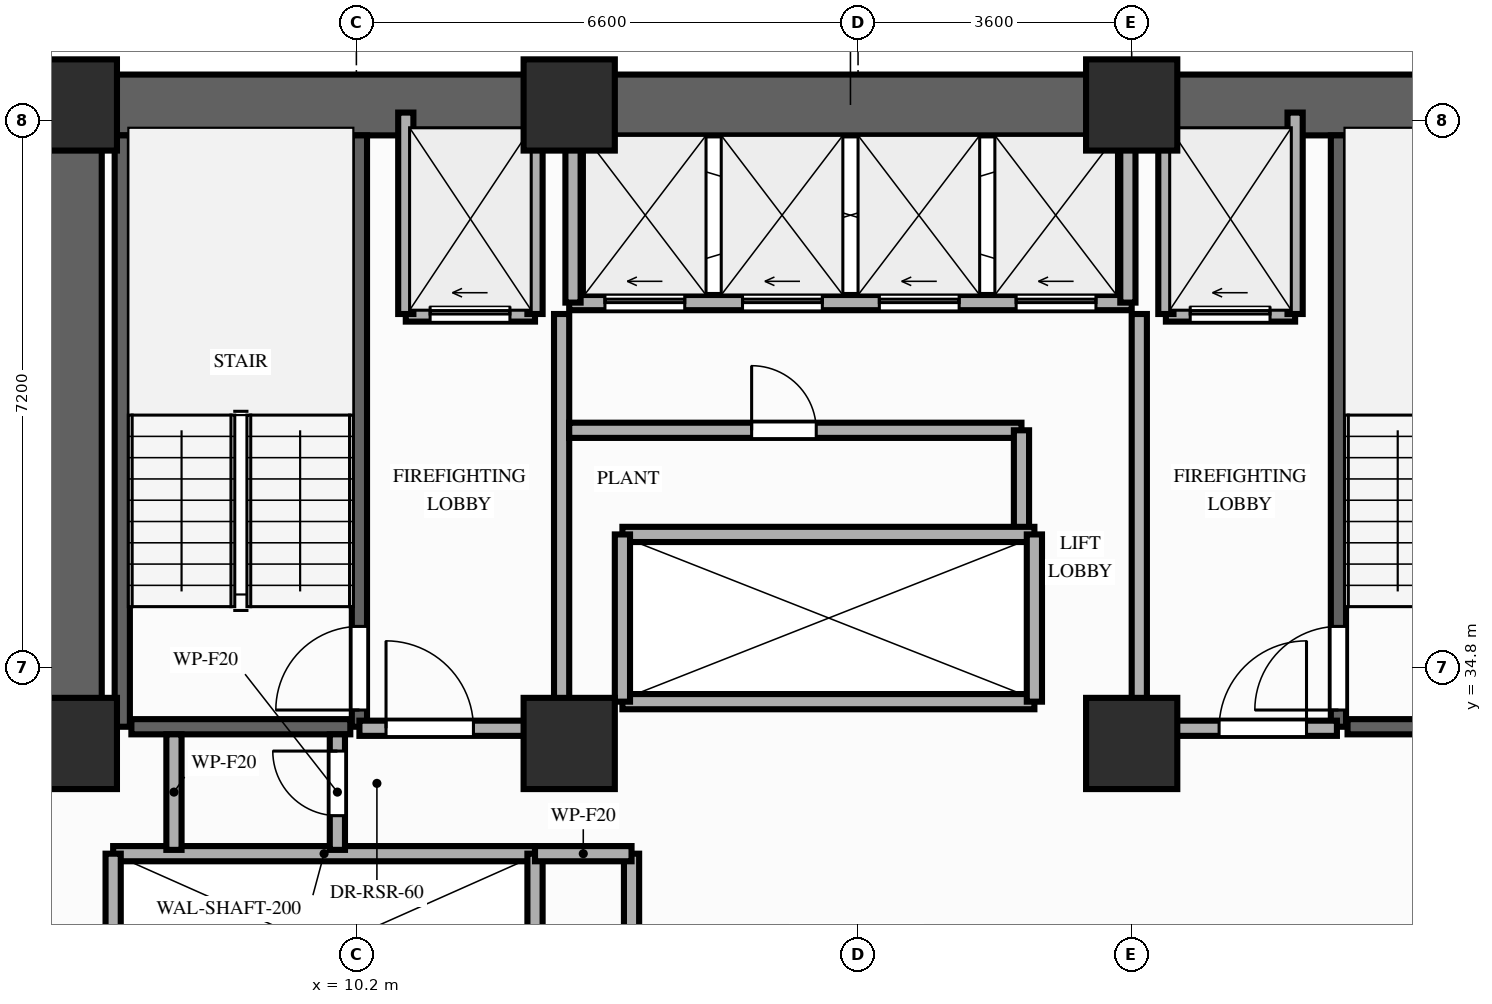
"""IFC4 building model, lengths in metres.
Left out: names, types, materials, properties, quantities, classifications, styles, units other than length and angle.
Written with IfcOpenShell. Run it as: python <this file> out.ifc"""

import sys

from ifc_helpers import new_model, si_unit, direction, frame, frame_2d, origin, origin_2d, place, context, subcontext, project, spatial, rectangle, extrude, element, fill, save


model = new_model("IFC4")
c1 = context("Model", 3, precision=1e-05, world=origin(), true_north=direction((0.0, 1.0)))
c2 = subcontext(c1, "Body", "Model", "MODEL_VIEW")
j1 = project(units=[si_unit("LENGTHUNIT", "METRE"), si_unit("PLANEANGLEUNIT", "RADIAN")], contexts=[c1])
p1 = place(None, origin())
s1 = spatial("IfcSite", under=j1, at=p1, CompositionType="ELEMENT")
p2 = place(p1, origin())
s2 = spatial("IfcBuilding", under=s1, at=p2, CompositionType="ELEMENT")
p3 = place(p2, frame((0.0, 0.0, 69.2)))
s3 = spatial("IfcBuildingStorey", under=s2, at=p3, CompositionType="ELEMENT", Elevation=69.2)
for number, where, z_axis, x_axis in (
    (1, (6.45, 33.8, 0.0), (0.0, 0.0, 1.0), (1.0, 0.0, 0.0)),
    (2, (13.0, 33.8, 0.0), (0.0, 0.0, 1.0), (1.0, 0.0, 0.0)),
    (3, (20.4, 33.8, 0.0), (0.0, 0.0, 1.0), (1.0, 0.0, 0.0)),
    (4, (6.45, 42.2, 0.0), (0.0, 0.0, 1.0), (1.0, 0.0, 0.0)),
    (5, (13.0, 42.2, 0.0), (0.0, 0.0, 1.0), (1.0, 0.0, 0.0)),
    (6, (20.4, 42.2, 0.0), (0.0, 0.0, 1.0), (1.0, 0.0, 0.0)),
):
    element("IfcColumn", number, at=place(p3, frame(where, z_axis=z_axis, x_axis=x_axis)), inside=s3, PredefinedType="COLUMN", context=c2, shape_type="SweptSolid", body=[
        extrude(rectangle(XDim=1.2, YDim=1.2, at=origin_2d()), origin(), (0.0, 0.0, 1.0), 3.2),
    ])
p4 = place(p3, frame((6.45, 42.2, 0.0), z_axis=(0.0, 0.0, 1.0), x_axis=(1.0, 0.0, 0.0)))
e7 = element("IfcWall", 7, at=p4, inside=s3, PredefinedType="SHEAR", context=c2, shape_type="SweptSolid", body=[
    extrude(rectangle(XDim=20.45, YDim=0.8, at=frame_2d((10.225, 0.0))), origin(), (0.0, 0.0, 1.0), 3.02),
])
p5 = place(p3, frame((6.45, 33.8, 0.0), z_axis=(0.0, 0.0, 1.0), x_axis=(0.0, 1.0, 0.0)))
e8 = element("IfcWall", 8, at=p5, inside=s3, PredefinedType="SHEAR", context=c2, shape_type="SweptSolid", body=[
    extrude(rectangle(XDim=7.95, YDim=0.8, at=frame_2d((3.975, 0.0))), origin(), (0.0, 0.0, 1.0), 3.02),
])
p6 = place(p3, frame((7.12, 34.02, 0.0), z_axis=(0.0, 0.0, 1.0), x_axis=(0.0, 1.0, 0.0)))
e9 = element("IfcWall", 9, at=p6, inside=s3, PredefinedType="SHEAR", context=c2, shape_type="SweptSolid", body=[
    extrude(rectangle(XDim=7.78, YDim=0.2, at=frame_2d((3.89, 0.0))), origin(), (0.0, 0.0, 1.0), 3.02),
])
p7 = place(p3, frame((10.24, 34.02, 0.0), z_axis=(0.0, 0.0, 1.0), x_axis=(0.0, 1.0, 0.0)))
e10 = element("IfcWall", 10, at=p7, inside=s3, PredefinedType="SHEAR", context=c2, shape_type="SweptSolid", body=[
    extrude(rectangle(XDim=7.78, YDim=0.2, at=frame_2d((3.89, 0.0))), origin(), (0.0, 0.0, 1.0), 3.02),
])
p8 = place(p7, frame((0.22, 0.0, 0.0)))
e11 = element("IfcOpeningElement", 11, at=p8, cuts=e10, PredefinedType="OPENING", context=c2, shape_type="SweptSolid", body=[
    extrude(rectangle(XDim=1.1, YDim=2.15, at=frame_2d((0.55, 1.075))), frame((0.0, 0.11, 0.0), z_axis=(0.0, -1.0, 0.0), x_axis=(1.0, 0.0, 0.0)), (0.0, 0.0, 1.0), 0.22),
])
p9 = place(p3, frame((7.24, 34.02, 0.0), z_axis=(0.0, 0.0, 1.0), x_axis=(1.0, 0.0, 0.0)))
e12 = element("IfcWall", 12, at=p9, inside=s3, PredefinedType="SHEAR", context=c2, shape_type="SweptSolid", body=[
    extrude(rectangle(XDim=2.88, YDim=0.2, at=frame_2d((1.44, 0.0))), origin(), (0.0, 0.0, 1.0), 3.02),
])
p10 = place(p3, frame((23.12, 34.02, 0.0), z_axis=(0.0, 0.0, 1.0), x_axis=(0.0, 1.0, 0.0)))
e13 = element("IfcWall", 13, at=p10, inside=s3, PredefinedType="SHEAR", context=c2, shape_type="SweptSolid", body=[
    extrude(rectangle(XDim=7.78, YDim=0.2, at=frame_2d((3.89, 0.0))), origin(), (0.0, 0.0, 1.0), 3.02),
])
p11 = place(p10, frame((0.22, 0.0, 0.0)))
e14 = element("IfcOpeningElement", 14, at=p11, cuts=e13, PredefinedType="OPENING", context=c2, shape_type="SweptSolid", body=[
    extrude(rectangle(XDim=1.1, YDim=2.15, at=frame_2d((0.55, 1.075))), frame((0.0, 0.11, 0.0), z_axis=(0.0, -1.0, 0.0), x_axis=(1.0, 0.0, 0.0)), (0.0, 0.0, 1.0), 0.22),
])
p12 = place(p3, frame((23.24, 34.02, 0.0), z_axis=(0.0, 0.0, 1.0), x_axis=(1.0, 0.0, 0.0)))
e15 = element("IfcWall", 15, at=p12, inside=s3, PredefinedType="SHEAR", context=c2, shape_type="SweptSolid", body=[
    extrude(rectangle(XDim=2.88, YDim=0.2, at=frame_2d((1.44, 0.0))), origin(), (0.0, 0.0, 1.0), 3.02),
])
p13 = place(p3, frame((7.0, 32.35, 0.0), z_axis=(0.0, 0.0, 1.0), x_axis=(1.0, 0.0, 0.0)))
e16 = element("IfcWall", 16, at=p13, inside=s3, PredefinedType="MOVABLE", context=c2, shape_type="SweptSolid", body=[
    extrude(rectangle(XDim=5.55, YDim=0.2, at=frame_2d((2.775, 0.0))), origin(), (0.0, 0.0, 1.0), 3.02),
])
for number, where, z_axis, x_axis in (
    (17, (7.0, 29.85, 0.0), (0.0, 0.0, 1.0), (0.0, 1.0, 0.0)),
    (18, (12.55, 29.85, 0.0), (0.0, 0.0, 1.0), (0.0, 1.0, 0.0)),
):
    element("IfcWall", number, at=place(p3, frame(where, z_axis=z_axis, x_axis=x_axis)), inside=s3, PredefinedType="MOVABLE", context=c2, shape_type="SweptSolid", body=[
        extrude(rectangle(XDim=2.5, YDim=0.2, at=frame_2d((1.25, 0.0))), origin(), (0.0, 0.0, 1.0), 3.02),
    ])
p14 = place(p3, frame((10.85, 39.45, 0.0), z_axis=(0.0, 0.0, 1.0), x_axis=(1.0, 0.0, 0.0)))
e19 = element("IfcWall", 19, at=p14, inside=s3, PredefinedType="MOVABLE", context=c2, shape_type="SweptSolid", body=[
    extrude(rectangle(XDim=1.7, YDim=0.2, at=frame_2d((0.85, 0.0))), origin(), (0.0, 0.0, 1.0), 3.02),
])
p15 = place(p14, frame((0.32, 0.0, 0.0)))
e20 = element("IfcOpeningElement", 20, at=p15, cuts=e19, PredefinedType="OPENING", context=c2, shape_type="SweptSolid", body=[
    extrude(rectangle(XDim=1.05, YDim=2.15, at=frame_2d((0.525, 1.075))), frame((0.0, 0.11, 0.0), z_axis=(0.0, -1.0, 0.0), x_axis=(1.0, 0.0, 0.0)), (0.0, 0.0, 1.0), 0.22),
])
p16 = place(p3, frame((20.85, 39.45, 0.0), z_axis=(0.0, 0.0, 1.0), x_axis=(1.0, 0.0, 0.0)))
e21 = element("IfcWall", 21, at=p16, inside=s3, PredefinedType="MOVABLE", context=c2, shape_type="SweptSolid", body=[
    extrude(rectangle(XDim=1.7, YDim=0.2, at=frame_2d((0.85, 0.0))), origin(), (0.0, 0.0, 1.0), 3.02),
])
p17 = place(p16, frame((0.32, 0.0, 0.0)))
e22 = element("IfcOpeningElement", 22, at=p17, cuts=e21, PredefinedType="OPENING", context=c2, shape_type="SweptSolid", body=[
    extrude(rectangle(XDim=1.05, YDim=2.15, at=frame_2d((0.525, 1.075))), frame((0.0, 0.11, 0.0), z_axis=(0.0, -1.0, 0.0), x_axis=(1.0, 0.0, 0.0)), (0.0, 0.0, 1.0), 0.22),
])
for number, where, z_axis, x_axis in (
    (23, (10.85, 39.45, 0.0), (0.0, 0.0, 1.0), (0.0, 1.0, 0.0)),
    (24, (12.55, 39.45, 0.0), (0.0, 0.0, 1.0), (0.0, 1.0, 0.0)),
):
    element("IfcWall", number, at=place(p3, frame(where, z_axis=z_axis, x_axis=x_axis)), inside=s3, PredefinedType="MOVABLE", context=c2, shape_type="SweptSolid", body=[
        extrude(rectangle(XDim=2.65, YDim=0.2, at=frame_2d((1.325, 0.0))), origin(), (0.0, 0.0, 1.0), 2.41),
    ])
p18 = place(p3, frame((12.9, 34.0, 0.0), z_axis=(0.0, 0.0, 1.0), x_axis=(0.0, 1.0, 0.0)))
e25 = element("IfcWall", 25, at=p18, inside=s3, PredefinedType="PARTITIONING", context=c2, shape_type="SweptSolid", body=[
    extrude(rectangle(XDim=5.45, YDim=0.2, at=frame_2d((2.725, 0.0))), origin(), (0.0, 0.0, 1.0), 2.41),
])
p19 = place(p3, frame((10.24, 34.0, 0.0), z_axis=(0.0, 0.0, 1.0), x_axis=(1.0, 0.0, 0.0)))
e26 = element("IfcWall", 26, at=p19, inside=s3, PredefinedType="PARTITIONING", context=c2, shape_type="SweptSolid", body=[
    extrude(rectangle(XDim=2.66, YDim=0.2, at=frame_2d((1.33, 0.0))), origin(), (0.0, 0.0, 1.0), 2.41),
])
p20 = place(p19, frame((0.35, 0.0, 0.0)))
e27 = element("IfcOpeningElement", 27, at=p20, cuts=e26, PredefinedType="OPENING", context=c2, shape_type="SweptSolid", body=[
    extrude(rectangle(XDim=1.15, YDim=2.15, at=frame_2d((0.575, 1.075))), frame((0.0, 0.11, 0.0), z_axis=(0.0, -1.0, 0.0), x_axis=(1.0, 0.0, 0.0)), (0.0, 0.0, 1.0), 0.22),
])
for number, where, z_axis, x_axis in (
    (28, (20.85, 39.45, 0.0), (0.0, 0.0, 1.0), (0.0, 1.0, 0.0)),
    (29, (22.55, 39.45, 0.0), (0.0, 0.0, 1.0), (0.0, 1.0, 0.0)),
):
    element("IfcWall", number, at=place(p3, frame(where, z_axis=z_axis, x_axis=x_axis)), inside=s3, PredefinedType="MOVABLE", context=c2, shape_type="SweptSolid", body=[
        extrude(rectangle(XDim=2.65, YDim=0.2, at=frame_2d((1.325, 0.0))), origin(), (0.0, 0.0, 1.0), 2.41),
    ])
p21 = place(p3, frame((20.5, 34.0, 0.0), z_axis=(0.0, 0.0, 1.0), x_axis=(0.0, 1.0, 0.0)))
e30 = element("IfcWall", 30, at=p21, inside=s3, PredefinedType="PARTITIONING", context=c2, shape_type="SweptSolid", body=[
    extrude(rectangle(XDim=5.45, YDim=0.2, at=frame_2d((2.725, 0.0))), origin(), (0.0, 0.0, 1.0), 2.41),
])
p22 = place(p3, frame((20.5, 34.0, 0.0), z_axis=(0.0, 0.0, 1.0), x_axis=(1.0, 0.0, 0.0)))
e31 = element("IfcWall", 31, at=p22, inside=s3, PredefinedType="PARTITIONING", context=c2, shape_type="SweptSolid", body=[
    extrude(rectangle(XDim=2.6, YDim=0.2, at=frame_2d((1.3, 0.0))), origin(), (0.0, 0.0, 1.0), 2.41),
])
p23 = place(p22, frame((1.05, 0.0, 0.0)))
e32 = element("IfcOpeningElement", 32, at=p23, cuts=e31, PredefinedType="OPENING", context=c2, shape_type="SweptSolid", body=[
    extrude(rectangle(XDim=1.15, YDim=2.15, at=frame_2d((0.575, 1.075))), frame((0.0, 0.11, 0.0), z_axis=(0.0, -1.0, 0.0), x_axis=(1.0, 0.0, 0.0)), (0.0, 0.0, 1.0), 0.22),
])
p24 = place(p3, frame((13.82, 29.85, 0.0), z_axis=(0.0, 0.0, 1.0), x_axis=(0.0, 1.0, 0.0)))
e33 = element("IfcWall", 33, at=p24, inside=s3, PredefinedType="PARTITIONING", context=c2, shape_type="SweptSolid", body=[
    extrude(rectangle(XDim=2.5, YDim=0.2, at=frame_2d((1.25, 0.0))), origin(), (0.0, 0.0, 1.0), 3.02),
])
p25 = place(p3, frame((12.55, 32.35, 0.0), z_axis=(0.0, 0.0, 1.0), x_axis=(1.0, 0.0, 0.0)))
e34 = element("IfcWall", 34, at=p25, inside=s3, PredefinedType="PARTITIONING", context=c2, shape_type="SweptSolid", body=[
    extrude(rectangle(XDim=1.27, YDim=0.2, at=frame_2d((0.635, 0.0))), origin(), (0.0, 0.0, 1.0), 3.02),
])
p26 = place(p3, frame((7.8, 32.4, 0.0), z_axis=(0.0, 0.0, 1.0), x_axis=(0.0, 1.0, 0.0)))
e35 = element("IfcWall", 35, at=p26, inside=s3, PredefinedType="PARTITIONING", context=c2, shape_type="SweptSolid", body=[
    extrude(rectangle(XDim=1.52, YDim=0.2, at=frame_2d((0.76, 0.0))), origin(), (0.0, 0.0, 1.0), 2.41),
])
p27 = place(p3, frame((9.95, 32.4, 0.0), z_axis=(0.0, 0.0, 1.0), x_axis=(0.0, 1.0, 0.0)))
e36 = element("IfcWall", 36, at=p27, inside=s3, PredefinedType="PARTITIONING", context=c2, shape_type="SweptSolid", body=[
    extrude(rectangle(XDim=1.52, YDim=0.2, at=frame_2d((0.76, 0.0))), origin(), (0.0, 0.0, 1.0), 2.41),
])
p28 = place(p27, frame((0.45, 0.0, 0.0)))
e37 = element("IfcOpeningElement", 37, at=p28, cuts=e36, PredefinedType="OPENING", context=c2, shape_type="SweptSolid", body=[
    extrude(rectangle(XDim=0.85, YDim=2.05, at=frame_2d((0.425, 1.025))), frame((0.0, 0.11, 0.0), z_axis=(0.0, -1.0, 0.0), x_axis=(1.0, 0.0, 0.0)), (0.0, 0.0, 1.0), 0.22),
])
p29 = place(p3, frame((13.0, 39.6, 0.0), z_axis=(0.0, 0.0, 1.0), x_axis=(1.0, 0.0, 0.0)))
e38 = element("IfcWall", 38, at=p29, inside=s3, PredefinedType="MOVABLE", context=c2, shape_type="SweptSolid", body=[
    extrude(rectangle(XDim=7.4, YDim=0.2, at=frame_2d((3.7, 0.0))), origin(), (0.0, 0.0, 1.0), 3.02),
])
p30 = place(p29, frame((0.47, 0.0, 0.0)))
e39 = element("IfcOpeningElement", 39, at=p30, cuts=e38, PredefinedType="OPENING", context=c2, shape_type="SweptSolid", body=[
    extrude(rectangle(XDim=1.05, YDim=2.15, at=frame_2d((0.525, 1.075))), frame((0.0, 0.11, 0.0), z_axis=(0.0, -1.0, 0.0), x_axis=(1.0, 0.0, 0.0)), (0.0, 0.0, 1.0), 0.22),
])
p31 = place(p29, frame((2.28, 0.0, 0.0)))
e40 = element("IfcOpeningElement", 40, at=p31, cuts=e38, PredefinedType="OPENING", context=c2, shape_type="SweptSolid", body=[
    extrude(rectangle(XDim=1.05, YDim=2.15, at=frame_2d((0.525, 1.075))), frame((0.0, 0.11, 0.0), z_axis=(0.0, -1.0, 0.0), x_axis=(1.0, 0.0, 0.0)), (0.0, 0.0, 1.0), 0.22),
])
p32 = place(p29, frame((4.08, 0.0, 0.0)))
e41 = element("IfcOpeningElement", 41, at=p32, cuts=e38, PredefinedType="OPENING", context=c2, shape_type="SweptSolid", body=[
    extrude(rectangle(XDim=1.05, YDim=2.15, at=frame_2d((0.525, 1.075))), frame((0.0, 0.11, 0.0), z_axis=(0.0, -1.0, 0.0), x_axis=(1.0, 0.0, 0.0)), (0.0, 0.0, 1.0), 0.22),
])
p33 = place(p29, frame((5.88, 0.0, 0.0)))
e42 = element("IfcOpeningElement", 42, at=p33, cuts=e38, PredefinedType="OPENING", context=c2, shape_type="SweptSolid", body=[
    extrude(rectangle(XDim=1.05, YDim=2.15, at=frame_2d((0.525, 1.075))), frame((0.0, 0.11, 0.0), z_axis=(0.0, -1.0, 0.0), x_axis=(1.0, 0.0, 0.0)), (0.0, 0.0, 1.0), 0.22),
])
for number, where, z_axis, x_axis in (
    (43, (13.05, 39.6, 0.0), (0.0, 0.0, 1.0), (0.0, 1.0, 0.0)),
    (44, (20.35, 39.6, 0.0), (0.0, 0.0, 1.0), (0.0, 1.0, 0.0)),
):
    element("IfcWall", number, at=place(p3, frame(where, z_axis=z_axis, x_axis=x_axis)), inside=s3, PredefinedType="MOVABLE", context=c2, shape_type="SweptSolid", body=[
        extrude(rectangle(XDim=2.18, YDim=0.2, at=frame_2d((1.09, 0.0))), origin(), (0.0, 0.0, 1.0), 3.02),
    ])
p34 = place(p3, frame((13.0, 37.92, 0.0), z_axis=(0.0, 0.0, 1.0), x_axis=(1.0, 0.0, 0.0)))
e45 = element("IfcWall", 45, at=p34, inside=s3, PredefinedType="PARTITIONING", context=c2, shape_type="SweptSolid", body=[
    extrude(rectangle(XDim=5.95, YDim=0.2, at=frame_2d((2.975, 0.0))), origin(), (0.0, 0.0, 1.0), 3.02),
])
p35 = place(p34, frame((2.4, 0.0, 0.0)))
e46 = element("IfcOpeningElement", 46, at=p35, cuts=e45, PredefinedType="OPENING", context=c2, shape_type="SweptSolid", body=[
    extrude(rectangle(XDim=0.85, YDim=2.05, at=frame_2d((0.425, 1.025))), frame((0.0, 0.11, 0.0), z_axis=(0.0, -1.0, 0.0), x_axis=(1.0, 0.0, 0.0)), (0.0, 0.0, 1.0), 0.22),
])
p36 = place(p3, frame((18.95, 36.6, 0.0), z_axis=(0.0, 0.0, 1.0), x_axis=(0.0, 1.0, 0.0)))
e47 = element("IfcWall", 47, at=p36, inside=s3, PredefinedType="PARTITIONING", context=c2, shape_type="SweptSolid", body=[
    extrude(rectangle(XDim=1.32, YDim=0.2, at=frame_2d((0.66, 0.0))), origin(), (0.0, 0.0, 1.0), 3.02),
])
for number, where, z_axis, x_axis in (
    (48, (13.7, 34.35, 0.0), (0.0, 0.0, 1.0), (1.0, 0.0, 0.0)),
    (49, (13.7, 36.55, 0.0), (0.0, 0.0, 1.0), (1.0, 0.0, 0.0)),
):
    element("IfcWall", number, at=place(p3, frame(where, z_axis=z_axis, x_axis=x_axis)), inside=s3, PredefinedType="MOVABLE", context=c2, shape_type="SweptSolid", body=[
        extrude(rectangle(XDim=5.42, YDim=0.2, at=frame_2d((2.71, 0.0))), origin(), (0.0, 0.0, 1.0), 3.02),
    ])
for number, where, z_axis, x_axis in (
    (50, (13.7, 34.35, 0.0), (0.0, 0.0, 1.0), (0.0, 1.0, 0.0)),
    (51, (19.12, 34.35, 0.0), (0.0, 0.0, 1.0), (0.0, 1.0, 0.0)),
):
    element("IfcWall", number, at=place(p3, frame(where, z_axis=z_axis, x_axis=x_axis)), inside=s3, PredefinedType="MOVABLE", context=c2, shape_type="SweptSolid", body=[
        extrude(rectangle(XDim=2.2, YDim=0.2, at=frame_2d((1.1, 0.0))), origin(), (0.0, 0.0, 1.0), 3.02),
    ])
p37 = place(p8, origin())
e52 = element("IfcDoor", 52, at=p37, inside=s3, OperationType="SINGLE_SWING_LEFT", PredefinedType="DOOR", context=c2, shape_type="SweptSolid", body=[
    extrude(rectangle(XDim=1.1, YDim=2.15, at=frame_2d((0.55, 1.075))), frame((0.0, 0.025, 0.0), z_axis=(0.0, -1.0, 0.0), x_axis=(1.0, 0.0, 0.0)), (0.0, 0.0, 1.0), 0.05),
])
fill(e11, e52)
p38 = place(p11, origin())
e53 = element("IfcDoor", 53, at=p38, inside=s3, OperationType="SINGLE_SWING_LEFT", PredefinedType="DOOR", context=c2, shape_type="SweptSolid", body=[
    extrude(rectangle(XDim=1.1, YDim=2.15, at=frame_2d((0.55, 1.075))), frame((0.0, 0.025, 0.0), z_axis=(0.0, -1.0, 0.0), x_axis=(1.0, 0.0, 0.0)), (0.0, 0.0, 1.0), 0.05),
])
fill(e14, e53)
p39 = place(p15, origin())
e54 = element("IfcDoor", 54, at=p39, inside=s3, OperationType="SLIDING_TO_LEFT", PredefinedType="DOOR", context=c2, shape_type="SweptSolid", body=[
    extrude(rectangle(XDim=1.05, YDim=2.15, at=frame_2d((0.525, 1.075))), frame((0.0, 0.025, 0.0), z_axis=(0.0, -1.0, 0.0), x_axis=(1.0, 0.0, 0.0)), (0.0, 0.0, 1.0), 0.05),
])
fill(e20, e54)
p40 = place(p17, origin())
e55 = element("IfcDoor", 55, at=p40, inside=s3, OperationType="SLIDING_TO_LEFT", PredefinedType="DOOR", context=c2, shape_type="SweptSolid", body=[
    extrude(rectangle(XDim=1.05, YDim=2.15, at=frame_2d((0.525, 1.075))), frame((0.0, 0.025, 0.0), z_axis=(0.0, -1.0, 0.0), x_axis=(1.0, 0.0, 0.0)), (0.0, 0.0, 1.0), 0.05),
])
fill(e22, e55)
p41 = place(p20, origin())
e56 = element("IfcDoor", 56, at=p41, inside=s3, OperationType="SINGLE_SWING_LEFT", PredefinedType="DOOR", context=c2, shape_type="SweptSolid", body=[
    extrude(rectangle(XDim=1.15, YDim=2.15, at=frame_2d((0.575, 1.075))), frame((0.0, 0.025, 0.0), z_axis=(0.0, -1.0, 0.0), x_axis=(1.0, 0.0, 0.0)), (0.0, 0.0, 1.0), 0.05),
])
fill(e27, e56)
p42 = place(p23, origin())
e57 = element("IfcDoor", 57, at=p42, inside=s3, OperationType="SINGLE_SWING_RIGHT", PredefinedType="DOOR", context=c2, shape_type="SweptSolid", body=[
    extrude(rectangle(XDim=1.15, YDim=2.15, at=frame_2d((0.575, 1.075))), frame((0.0, 0.025, 0.0), z_axis=(0.0, -1.0, 0.0), x_axis=(1.0, 0.0, 0.0)), (0.0, 0.0, 1.0), 0.05),
])
fill(e32, e57)
p43 = place(p28, origin())
e58 = element("IfcDoor", 58, at=p43, inside=s3, OperationType="SINGLE_SWING_RIGHT", PredefinedType="DOOR", context=c2, shape_type="SweptSolid", body=[
    extrude(rectangle(XDim=0.85, YDim=2.05, at=frame_2d((0.425, 1.025))), frame((0.0, 0.025, 0.0), z_axis=(0.0, -1.0, 0.0), x_axis=(1.0, 0.0, 0.0)), (0.0, 0.0, 1.0), 0.05),
])
fill(e37, e58)
p44 = place(p30, origin())
e59 = element("IfcDoor", 59, at=p44, inside=s3, OperationType="SLIDING_TO_LEFT", PredefinedType="DOOR", context=c2, shape_type="SweptSolid", body=[
    extrude(rectangle(XDim=1.05, YDim=2.15, at=frame_2d((0.525, 1.075))), frame((0.0, 0.025, 0.0), z_axis=(0.0, -1.0, 0.0), x_axis=(1.0, 0.0, 0.0)), (0.0, 0.0, 1.0), 0.05),
])
fill(e39, e59)
p45 = place(p31, origin())
e60 = element("IfcDoor", 60, at=p45, inside=s3, OperationType="SLIDING_TO_LEFT", PredefinedType="DOOR", context=c2, shape_type="SweptSolid", body=[
    extrude(rectangle(XDim=1.05, YDim=2.15, at=frame_2d((0.525, 1.075))), frame((0.0, 0.025, 0.0), z_axis=(0.0, -1.0, 0.0), x_axis=(1.0, 0.0, 0.0)), (0.0, 0.0, 1.0), 0.05),
])
fill(e40, e60)
p46 = place(p32, origin())
e61 = element("IfcDoor", 61, at=p46, inside=s3, OperationType="SLIDING_TO_LEFT", PredefinedType="DOOR", context=c2, shape_type="SweptSolid", body=[
    extrude(rectangle(XDim=1.05, YDim=2.15, at=frame_2d((0.525, 1.075))), frame((0.0, 0.025, 0.0), z_axis=(0.0, -1.0, 0.0), x_axis=(1.0, 0.0, 0.0)), (0.0, 0.0, 1.0), 0.05),
])
fill(e41, e61)
p47 = place(p33, origin())
e62 = element("IfcDoor", 62, at=p47, inside=s3, OperationType="SLIDING_TO_LEFT", PredefinedType="DOOR", context=c2, shape_type="SweptSolid", body=[
    extrude(rectangle(XDim=1.05, YDim=2.15, at=frame_2d((0.525, 1.075))), frame((0.0, 0.025, 0.0), z_axis=(0.0, -1.0, 0.0), x_axis=(1.0, 0.0, 0.0)), (0.0, 0.0, 1.0), 0.05),
])
fill(e42, e62)
p48 = place(p35, origin())
e63 = element("IfcDoor", 63, at=p48, inside=s3, OperationType="SINGLE_SWING_LEFT", PredefinedType="DOOR", context=c2, shape_type="SweptSolid", body=[
    extrude(rectangle(XDim=0.85, YDim=2.05, at=frame_2d((0.425, 1.025))), frame((0.0, 0.025, 0.0), z_axis=(0.0, -1.0, 0.0), x_axis=(1.0, 0.0, 0.0)), (0.0, 0.0, 1.0), 0.05),
])
fill(e46, e63)
save(model, sys.argv[1])
